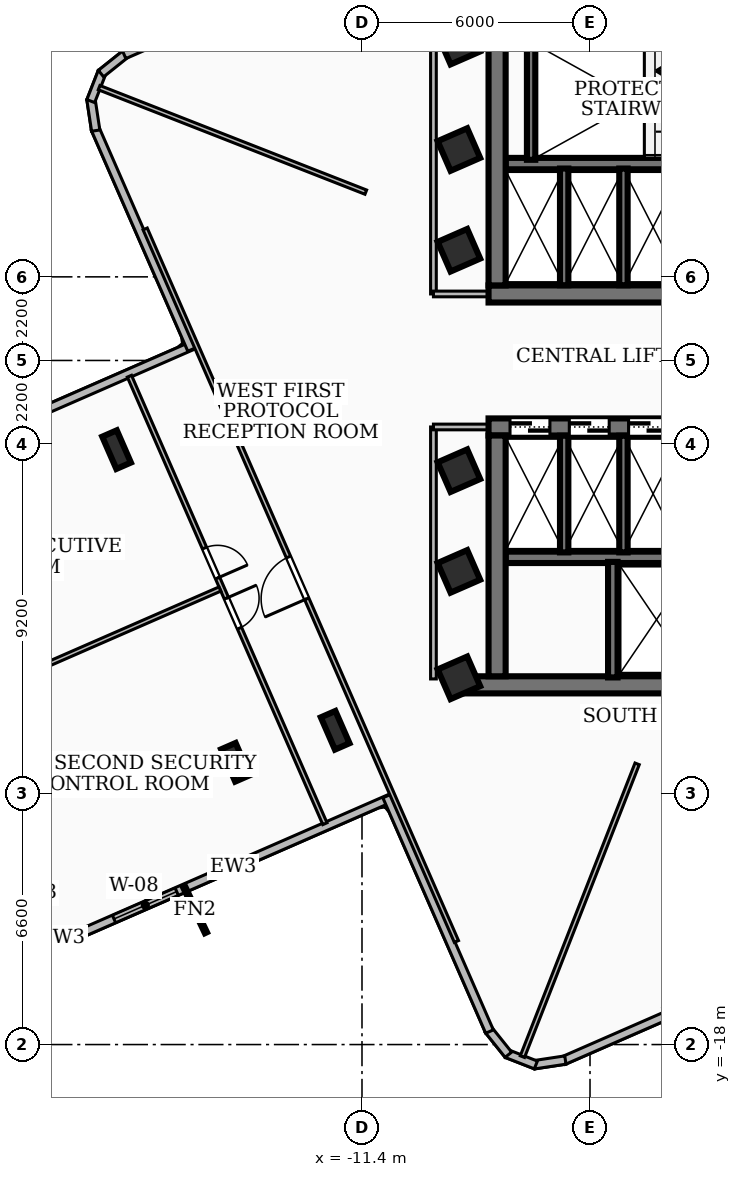
"""IFC4 building model, lengths in metres.
Left out: names, types, materials, properties, quantities, classifications, styles, units other than length and angle.
Written with IfcOpenShell. Run it as: python <this file> out.ifc"""

import sys

from ifc_helpers import new_model, si_unit, direction, frame, frame_2d, origin, origin_2d, place, context, subcontext, project, spatial, rectangle, i_section, extrude, element, fill, save


model = new_model("IFC4")
c1 = context("Model", 3, precision=1e-05, world=origin(), true_north=direction((0.0, 1.0)))
c2 = subcontext(c1, "Body", "Model", "MODEL_VIEW")
j1 = project(units=[si_unit("LENGTHUNIT", "METRE"), si_unit("PLANEANGLEUNIT", "RADIAN")], contexts=[c1])
p1 = place(None, origin())
s1 = spatial("IfcSite", under=j1, at=p1, CompositionType="ELEMENT")
p2 = place(p1, origin())
s2 = spatial("IfcBuilding", under=s1, at=p2, CompositionType="ELEMENT")
p3 = place(p2, frame((0.0, 0.0, 181.08)))
s3 = spatial("IfcBuildingStorey", under=s2, at=p3, CompositionType="ELEMENT", Elevation=181.08)
p4 = place(p3, frame((8.07, 1.75, 0.0), z_axis=(0.0, 0.0, 1.0), x_axis=(-1.0, 0.0, 0.0)))
e1 = element("IfcWall", 1, at=p4, inside=s3, PredefinedType="SHEAR", context=c2, shape_type="SweptSolid", body=[
    extrude(rectangle(XDim=16.14, YDim=0.45, at=frame_2d((8.07, 0.0))), origin(), (0.0, 0.0, 1.0), 3.34),
])
p5 = place(p4, frame((7.45, 0.0, 0.0)))
e2 = element("IfcOpeningElement", 2, at=p5, cuts=e1, PredefinedType="OPENING", context=c2, shape_type="SweptSolid", body=[
    extrude(rectangle(XDim=1.0, YDim=2.1, at=frame_2d((0.5, 1.05))), frame((0.0, 0.235, 0.0), z_axis=(0.0, -1.0, 0.0), x_axis=(1.0, 0.0, 0.0)), (0.0, 0.0, 1.0), 0.47),
])
p6 = place(p4, frame((3.85, 0.0, 0.0)))
e3 = element("IfcOpeningElement", 3, at=p6, cuts=e1, PredefinedType="OPENING", context=c2, shape_type="SweptSolid", body=[
    extrude(rectangle(XDim=0.9, YDim=2.06, at=frame_2d((0.45, 1.03))), frame((0.0, 0.235, 0.0), z_axis=(0.0, -1.0, 0.0), x_axis=(1.0, 0.0, 0.0)), (0.0, 0.0, 1.0), 0.47),
])
p7 = place(p4, frame((2.35, 0.0, 0.0)))
e4 = element("IfcOpeningElement", 4, at=p7, cuts=e1, PredefinedType="OPENING", context=c2, shape_type="SweptSolid", body=[
    extrude(rectangle(XDim=0.9, YDim=2.06, at=frame_2d((0.45, 1.03))), frame((0.0, 0.235, 0.0), z_axis=(0.0, -1.0, 0.0), x_axis=(1.0, 0.0, 0.0)), (0.0, 0.0, 1.0), 0.47),
])
p8 = place(p4, frame((0.8, 0.0, 0.0)))
e5 = element("IfcOpeningElement", 5, at=p8, cuts=e1, PredefinedType="OPENING", context=c2, shape_type="SweptSolid", body=[
    extrude(rectangle(XDim=0.9, YDim=2.06, at=frame_2d((0.45, 1.03))), frame((0.0, 0.235, 0.0), z_axis=(0.0, -1.0, 0.0), x_axis=(1.0, 0.0, 0.0)), (0.0, 0.0, 1.0), 0.47),
])
p9 = place(p3, frame((-7.845, 1.975, 0.0), z_axis=(0.0, 0.0, 1.0), x_axis=(0.0, 1.0, 0.0)))
e6 = element("IfcWall", 6, at=p9, inside=s3, PredefinedType="SHEAR", context=c2, shape_type="SweptSolid", body=[
    extrude(rectangle(XDim=6.335, YDim=0.45, at=frame_2d((3.167, 0.0))), origin(), (0.0, 0.0, 1.0), 3.34),
])
p10 = place(p3, frame((7.62, 5.18, 0.0), z_axis=(0.0, 0.0, 1.0), x_axis=(-1.0, 0.0, 0.0)))
e7 = element("IfcWall", 7, at=p10, inside=s3, PredefinedType="SOLIDWALL", context=c2, shape_type="SweptSolid", body=[
    extrude(rectangle(XDim=15.24, YDim=0.3, at=frame_2d((7.62, 0.0))), origin(), (0.0, 0.0, 1.0), 3.34),
])
p11 = place(p10, frame((5.77, 0.0, 0.0)))
e8 = element("IfcOpeningElement", 8, at=p11, cuts=e7, PredefinedType="OPENING", context=c2, shape_type="SweptSolid", body=[
    extrude(rectangle(XDim=1.1, YDim=2.15, at=frame_2d((0.55, 1.075))), frame((0.0, 0.16, 0.0), z_axis=(0.0, -1.0, 0.0), x_axis=(1.0, 0.0, 0.0)), (0.0, 0.0, 1.0), 0.32),
])
p12 = place(p10, frame((2.97, 0.0, 0.0)))
e9 = element("IfcOpeningElement", 9, at=p12, cuts=e7, PredefinedType="OPENING", context=c2, shape_type="SweptSolid", body=[
    extrude(rectangle(XDim=1.1, YDim=2.15, at=frame_2d((0.55, 1.075))), frame((0.0, 0.16, 0.0), z_axis=(0.0, -1.0, 0.0), x_axis=(1.0, 0.0, 0.0)), (0.0, 0.0, 1.0), 0.32),
])
p13 = place(p10, frame((7.97, 0.0, 0.0)))
e10 = element("IfcOpeningElement", 10, at=p13, cuts=e7, PredefinedType="OPENING", context=c2, shape_type="SweptSolid", body=[
    extrude(rectangle(XDim=1.0, YDim=2.1, at=frame_2d((0.5, 1.05))), frame((0.0, 0.16, 0.0), z_axis=(0.0, -1.0, 0.0), x_axis=(1.0, 0.0, 0.0)), (0.0, 0.0, 1.0), 0.32),
])
p14 = place(p3, frame((8.78, -8.535, 0.0), z_axis=(0.0, 0.0, 1.0), x_axis=(-1.0, 0.0, 0.0)))
e11 = element("IfcWall", 11, at=p14, inside=s3, PredefinedType="SHEAR", context=c2, shape_type="SweptSolid", body=[
    extrude(rectangle(XDim=17.56, YDim=0.45, at=frame_2d((8.78, 0.0))), origin(), (0.0, 0.0, 1.0), 3.34),
])
p15 = place(p3, frame((-8.07, -1.75, 0.0), z_axis=(0.0, 0.0, 1.0), x_axis=(1.0, 0.0, 0.0)))
e12 = element("IfcWall", 12, at=p15, inside=s3, PredefinedType="SHEAR", context=c2, shape_type="SweptSolid", body=[
    extrude(rectangle(XDim=16.14, YDim=0.45, at=frame_2d((8.07, 0.0))), origin(), (0.0, 0.0, 1.0), 3.34),
])
p16 = place(p15, frame((7.45, 0.0, 0.0)))
e13 = element("IfcOpeningElement", 13, at=p16, cuts=e12, PredefinedType="OPENING", context=c2, shape_type="SweptSolid", body=[
    extrude(rectangle(XDim=1.0, YDim=2.1, at=frame_2d((0.5, 1.05))), frame((0.0, 0.235, 0.0), z_axis=(0.0, -1.0, 0.0), x_axis=(1.0, 0.0, 0.0)), (0.0, 0.0, 1.0), 0.47),
])
p17 = place(p15, frame((12.65, 0.0, 0.0)))
e14 = element("IfcOpeningElement", 14, at=p17, cuts=e12, PredefinedType="OPENING", context=c2, shape_type="SweptSolid", body=[
    extrude(rectangle(XDim=0.9, YDim=2.06, at=frame_2d((0.45, 1.03))), frame((0.0, 0.235, 0.0), z_axis=(0.0, -1.0, 0.0), x_axis=(1.0, 0.0, 0.0)), (0.0, 0.0, 1.0), 0.47),
])
p18 = place(p15, frame((0.565, 0.0, 0.0)))
e15 = element("IfcOpeningElement", 15, at=p18, cuts=e12, PredefinedType="OPENING", context=c2, shape_type="SweptSolid", body=[
    extrude(rectangle(XDim=1.05, YDim=2.15, at=frame_2d((0.525, 1.075))), frame((0.0, 0.235, 0.0), z_axis=(0.0, -1.0, 0.0), x_axis=(1.0, 0.0, 0.0)), (0.0, 0.0, 1.0), 0.47),
])
p19 = place(p15, frame((2.125, 0.0, 0.0)))
e16 = element("IfcOpeningElement", 16, at=p19, cuts=e12, PredefinedType="OPENING", context=c2, shape_type="SweptSolid", body=[
    extrude(rectangle(XDim=1.05, YDim=2.15, at=frame_2d((0.525, 1.075))), frame((0.0, 0.235, 0.0), z_axis=(0.0, -1.0, 0.0), x_axis=(1.0, 0.0, 0.0)), (0.0, 0.0, 1.0), 0.47),
])
p20 = place(p15, frame((3.685, 0.0, 0.0)))
e17 = element("IfcOpeningElement", 17, at=p20, cuts=e12, PredefinedType="OPENING", context=c2, shape_type="SweptSolid", body=[
    extrude(rectangle(XDim=1.05, YDim=2.15, at=frame_2d((0.525, 1.075))), frame((0.0, 0.235, 0.0), z_axis=(0.0, -1.0, 0.0), x_axis=(1.0, 0.0, 0.0)), (0.0, 0.0, 1.0), 0.47),
])
p21 = place(p3, frame((-7.845, -8.31, 0.0), z_axis=(0.0, 0.0, 1.0), x_axis=(0.0, 1.0, 0.0)))
e18 = element("IfcWall", 18, at=p21, inside=s3, PredefinedType="SHEAR", context=c2, shape_type="SweptSolid", body=[
    extrude(rectangle(XDim=6.335, YDim=0.45, at=frame_2d((3.167, 0.0))), origin(), (0.0, 0.0, 1.0), 3.34),
])
p22 = place(p3, frame((-7.62, -5.18, 0.0), z_axis=(0.0, 0.0, 1.0), x_axis=(1.0, 0.0, 0.0)))
e19 = element("IfcWall", 19, at=p22, inside=s3, PredefinedType="SOLIDWALL", context=c2, shape_type="SweptSolid", body=[
    extrude(rectangle(XDim=15.24, YDim=0.3, at=frame_2d((7.62, 0.0))), origin(), (0.0, 0.0, 1.0), 3.34),
])
p23 = place(p22, frame((5.77, 0.0, 0.0)))
e20 = element("IfcOpeningElement", 20, at=p23, cuts=e19, PredefinedType="OPENING", context=c2, shape_type="SweptSolid", body=[
    extrude(rectangle(XDim=1.1, YDim=2.15, at=frame_2d((0.55, 1.075))), frame((0.0, 0.16, 0.0), z_axis=(0.0, -1.0, 0.0), x_axis=(1.0, 0.0, 0.0)), (0.0, 0.0, 1.0), 0.32),
])
p24 = place(p22, frame((7.97, 0.0, 0.0)))
e21 = element("IfcOpeningElement", 21, at=p24, cuts=e19, PredefinedType="OPENING", context=c2, shape_type="SweptSolid", body=[
    extrude(rectangle(XDim=1.0, YDim=2.1, at=frame_2d((0.5, 1.05))), frame((0.0, 0.16, 0.0), z_axis=(0.0, -1.0, 0.0), x_axis=(1.0, 0.0, 0.0)), (0.0, 0.0, 1.0), 0.32),
])
p25 = place(p3, frame((-6.95, 5.28, 0.0), z_axis=(0.0, 0.0, 1.0), x_axis=(0.0, 1.0, 0.0)))
e22 = element("IfcWall", 22, at=p25, inside=s3, PredefinedType="SOLIDWALL", context=c2, shape_type="SweptSolid", body=[
    extrude(rectangle(XDim=3.06, YDim=0.22, at=frame_2d((1.53, 0.0))), origin(), (0.0, 0.0, 1.0), 3.34),
])
p26 = place(p3, frame((-4.8, -8.34, 0.0), z_axis=(0.0, 0.0, 1.0), x_axis=(0.0, 1.0, 0.0)))
e23 = element("IfcWall", 23, at=p26, inside=s3, PredefinedType="SOLIDWALL", context=c2, shape_type="SweptSolid", body=[
    extrude(rectangle(XDim=3.04, YDim=0.25, at=frame_2d((1.52, 0.0))), origin(), (0.0, 0.0, 1.0), 3.34),
])
for number, where, z_axis, x_axis in (
    (24, (-6.08, 1.98, 0.0), (0.0, 0.0, 1.0), (0.0, 1.0, 0.0)),
    (25, (-4.52, 1.98, 0.0), (0.0, 0.0, 1.0), (0.0, 1.0, 0.0)),
    (26, (-6.08, -5.05, 0.0), (0.0, 0.0, 1.0), (0.0, 1.0, 0.0)),
    (27, (-4.52, -5.05, 0.0), (0.0, 0.0, 1.0), (0.0, 1.0, 0.0)),
):
    element("IfcWall", number, at=place(p3, frame(where, z_axis=z_axis, x_axis=x_axis)), inside=s3, PredefinedType="SOLIDWALL", context=c2, shape_type="SweptSolid", body=[
        extrude(rectangle(XDim=3.07, YDim=0.22, at=frame_2d((1.535, 0.0))), origin(), (0.0, 0.0, 1.0), 3.34),
    ])
for number, where, z_axis, x_axis in (
    (28, (-8.85, -5.55, 0.0), (0.0, 0.0, 1.0), (0.916, 0.4, 0.0)),
    (29, (-8.85, -2.9, 0.0), (0.0, 0.0, 1.0), (0.916, 0.4, 0.0)),
    (30, (-8.85, 2.9, 0.0), (0.0, 0.0, 1.0), (0.916, 0.4, 0.0)),
    (31, (-8.85, 5.55, 0.0), (0.0, 0.0, 1.0), (0.916, 0.4, 0.0)),
    (32, (-8.85, 8.35, 0.0), (0.0, 0.0, 1.0), (0.916, 0.4, 0.0)),
    (33, (-8.85, -8.35, 0.0), (0.0, 0.0, 1.0), (0.916, 0.4, 0.0)),
):
    element("IfcColumn", number, at=place(p3, frame(where, z_axis=z_axis, x_axis=x_axis)), inside=s3, PredefinedType="COLUMN", context=c2, shape_type="SweptSolid", body=[
        extrude(rectangle(XDim=0.85, YDim=0.85, at=origin_2d()), origin(), (0.0, 0.0, 1.0), 3.6),
    ])
for number, where, z_axis, x_axis in (
    (34, (-17.858, -2.346, 0.0), (0.0, 0.0, 1.0), (0.916, 0.4, 0.0)),
    (35, (-12.106, -9.731, 0.0), (0.0, 0.0, 1.0), (0.916, 0.4, 0.0)),
    (36, (-14.731, -10.573, 0.0), (0.0, 0.0, 1.0), (0.916, 0.4, 0.0)),
):
    element("IfcColumn", number, at=place(p3, frame(where, z_axis=z_axis, x_axis=x_axis)), inside=s3, PredefinedType="COLUMN", context=c2, shape_type="SweptSolid", body=[
        extrude(i_section(OverallWidth=0.418, OverallDepth=0.927, WebThickness=0.019, FlangeThickness=0.032, at=origin_2d()), origin(), (0.0, 0.0, 1.0), 3.6),
    ])
p27 = place(p3, frame((-10.634, -11.51, 0.0), z_axis=(0.0, 0.0, 1.0), x_axis=(-0.91637186732, -0.400328116405, 0.0)))
e37 = element("IfcWall", 37, at=p27, inside=s3, PredefinedType="SOLIDWALL", context=c2, shape_type="SweptSolid", body=[
    extrude(rectangle(XDim=9.058, YDim=0.22, at=frame_2d((4.529, 0.0))), origin(), (0.0, 0.0, 1.0), 3.34),
])
p28 = place(p27, frame((6.157, 0.0, 0.85)))
e38 = element("IfcOpeningElement", 38, at=p28, cuts=e37, PredefinedType="OPENING", context=c2, shape_type="SweptSolid", body=[
    extrude(rectangle(XDim=1.8, YDim=1.8, at=frame_2d((0.9, 0.9))), frame((0.0, 0.12, 0.0), z_axis=(0.0, -1.0, 0.0), x_axis=(1.0, 0.0, 0.0)), (0.0, 0.0, 1.0), 0.24),
])
p29 = place(p3, frame((-18.886, -15.122, 0.0), z_axis=(0.0, 0.0, 1.0), x_axis=(-0.988566813851, -0.150783469095, 0.0)))
e39 = element("IfcWall", 39, at=p29, inside=s3, PredefinedType="SOLIDWALL", context=c2, shape_type="SweptSolid", body=[
    extrude(rectangle(XDim=0.835, YDim=0.22, at=frame_2d((0.418, 0.0))), origin(), (0.0, 0.0, 1.0), 3.34),
])
p30 = place(p3, frame((-24.139, -3.224, 0.0), z_axis=(0.0, 0.0, 1.0), x_axis=(0.916356987606, 0.400362175117, 0.0)))
e40 = element("IfcWall", 40, at=p30, inside=s3, PredefinedType="SOLIDWALL", context=c2, shape_type="SweptSolid", body=[
    extrude(rectangle(XDim=9.06, YDim=0.22, at=frame_2d((4.53, 0.0))), origin(), (0.0, 0.0, 1.0), 3.34),
])
p31 = place(p30, frame((1.1, 0.0, 0.85)))
e41 = element("IfcOpeningElement", 41, at=p31, cuts=e40, PredefinedType="OPENING", context=c2, shape_type="SweptSolid", body=[
    extrude(rectangle(XDim=2.4, YDim=2.1, at=frame_2d((1.2, 1.05))), frame((0.0, 0.12, 0.0), z_axis=(0.0, -1.0, 0.0), x_axis=(1.0, 0.0, 0.0)), (0.0, 0.0, 1.0), 0.24),
])
p32 = place(p3, frame((-15.883, 0.287, 0.0), z_axis=(0.0, 0.0, 1.0), x_axis=(-0.400352069216, 0.916361402872, 0.0)))
e42 = element("IfcWall", 42, at=p32, inside=s3, PredefinedType="SOLIDWALL", context=c2, shape_type="SweptSolid", body=[
    extrude(rectangle(XDim=6.339, YDim=0.22, at=frame_2d((3.169, 0.0))), origin(), (0.0, 0.0, 1.0), 3.34),
])
p33 = place(p3, frame((-18.407, 6.048, 0.0), z_axis=(0.0, 0.0, 1.0), x_axis=(-0.149814047271, 0.988714190876, 0.0)))
e43 = element("IfcWall", 43, at=p33, inside=s3, PredefinedType="SOLIDWALL", context=c2, shape_type="SweptSolid", body=[
    extrude(rectangle(XDim=0.834, YDim=0.22, at=frame_2d((0.417, 0.0))), origin(), (0.0, 0.0, 1.0), 3.34),
])
p34 = place(p3, frame((-18.537, 6.825, 0.0), z_axis=(0.0, 0.0, 1.0), x_axis=(0.364331843435, 0.931269191941, 0.0)))
e44 = element("IfcWall", 44, at=p34, inside=s3, PredefinedType="SOLIDWALL", context=c2, shape_type="SweptSolid", body=[
    extrude(rectangle(XDim=0.818, YDim=0.22, at=frame_2d((0.409, 0.0))), origin(), (0.0, 0.0, 1.0), 3.34),
])
p35 = place(p3, frame((-18.268, 7.548, 0.0), z_axis=(0.0, 0.0, 1.0), x_axis=(0.781153625844, 0.624338860581, 0.0)))
e45 = element("IfcWall", 45, at=p35, inside=s3, PredefinedType="SOLIDWALL", context=c2, shape_type="SweptSolid", body=[
    extrude(rectangle(XDim=0.836, YDim=0.22, at=frame_2d((0.418, 0.0))), origin(), (0.0, 0.0, 1.0), 3.34),
])
p36 = place(p3, frame((-17.658, 8.044, 0.0), z_axis=(0.0, 0.0, 1.0), x_axis=(0.916361145567, 0.400352658158, 0.0)))
e46 = element("IfcWall", 46, at=p36, inside=s3, PredefinedType="SOLIDWALL", context=c2, shape_type="SweptSolid", body=[
    extrude(rectangle(XDim=6.759, YDim=0.22, at=frame_2d((3.38, 0.0))), origin(), (0.0, 0.0, 1.0), 3.34),
])
p37 = place(p3, frame((-0.287, -15.883, 0.0), z_axis=(0.0, 0.0, 1.0), x_axis=(-0.916361402872, -0.400352069216, 0.0)))
e47 = element("IfcWall", 47, at=p37, inside=s3, PredefinedType="SOLIDWALL", context=c2, shape_type="SweptSolid", body=[
    extrude(rectangle(XDim=6.339, YDim=0.22, at=frame_2d((3.169, 0.0))), origin(), (0.0, 0.0, 1.0), 3.34),
])
p38 = place(p3, frame((-6.048, -18.407, 0.0), z_axis=(0.0, 0.0, 1.0), x_axis=(-0.988714190876, -0.149814047271, 0.0)))
e48 = element("IfcWall", 48, at=p38, inside=s3, PredefinedType="SOLIDWALL", context=c2, shape_type="SweptSolid", body=[
    extrude(rectangle(XDim=0.834, YDim=0.22, at=frame_2d((0.417, 0.0))), origin(), (0.0, 0.0, 1.0), 3.34),
])
p39 = place(p3, frame((-6.825, -18.537, 0.0), z_axis=(0.0, 0.0, 1.0), x_axis=(-0.931269191941, 0.364331843435, 0.0)))
e49 = element("IfcWall", 49, at=p39, inside=s3, PredefinedType="SOLIDWALL", context=c2, shape_type="SweptSolid", body=[
    extrude(rectangle(XDim=0.818, YDim=0.22, at=frame_2d((0.409, 0.0))), origin(), (0.0, 0.0, 1.0), 3.34),
])
p40 = place(p3, frame((-7.548, -18.268, 0.0), z_axis=(0.0, 0.0, 1.0), x_axis=(-0.624338860581, 0.781153625844, 0.0)))
e50 = element("IfcWall", 50, at=p40, inside=s3, PredefinedType="SOLIDWALL", context=c2, shape_type="SweptSolid", body=[
    extrude(rectangle(XDim=0.836, YDim=0.22, at=frame_2d((0.418, 0.0))), origin(), (0.0, 0.0, 1.0), 3.34),
])
p41 = place(p3, frame((-8.044, -17.658, 0.0), z_axis=(0.0, 0.0, 1.0), x_axis=(-0.400352658158, 0.916361145567, 0.0)))
e51 = element("IfcWall", 51, at=p41, inside=s3, PredefinedType="SOLIDWALL", context=c2, shape_type="SweptSolid", body=[
    extrude(rectangle(XDim=6.759, YDim=0.22, at=frame_2d((3.38, 0.0))), origin(), (0.0, 0.0, 1.0), 3.34),
])
p42 = place(p3, frame((-9.52, 1.75, 0.0), z_axis=(0.0, 0.0, 1.0), x_axis=(0.0, 1.0, 0.0)))
e52 = element("IfcWall", 52, at=p42, inside=s3, PredefinedType="PARTITIONING", context=c2, shape_type="SweptSolid", body=[
    extrude(rectangle(XDim=6.63, YDim=0.15, at=frame_2d((3.315, 0.0))), origin(), (0.0, 0.0, 1.0), 3.34),
])
p43 = place(p3, frame((-7.85, 1.75, 0.0), z_axis=(0.0, 0.0, 1.0), x_axis=(-1.0, 0.0, 0.0)))
e53 = element("IfcWall", 53, at=p43, inside=s3, PredefinedType="PARTITIONING", context=c2, shape_type="SweptSolid", body=[
    extrude(rectangle(XDim=1.67, YDim=0.15, at=frame_2d((0.835, 0.0))), origin(), (0.0, 0.0, 1.0), 2.57),
])
p44 = place(p3, frame((-9.52, -8.38, 0.0), z_axis=(0.0, 0.0, 1.0), x_axis=(0.0, 1.0, 0.0)))
e54 = element("IfcWall", 54, at=p44, inside=s3, PredefinedType="PARTITIONING", context=c2, shape_type="SweptSolid", body=[
    extrude(rectangle(XDim=6.63, YDim=0.15, at=frame_2d((3.315, 0.0))), origin(), (0.0, 0.0, 1.0), 2.644),
])
p45 = place(p3, frame((-7.85, -1.75, 0.0), z_axis=(0.0, 0.0, 1.0), x_axis=(-1.0, 0.0, 0.0)))
e55 = element("IfcWall", 55, at=p45, inside=s3, PredefinedType="PARTITIONING", context=c2, shape_type="SweptSolid", body=[
    extrude(rectangle(XDim=1.67, YDim=0.15, at=frame_2d((0.835, 0.0))), origin(), (0.0, 0.0, 1.0), 2.57),
])
p46 = place(p3, frame((-11.3, 4.429, 0.0), z_axis=(0.0, 0.0, 1.0), x_axis=(-0.931071596241, 0.364836514995, 0.0)))
e56 = element("IfcWall", 56, at=p46, inside=s3, PredefinedType="PARTITIONING", context=c2, shape_type="SweptSolid", body=[
    extrude(rectangle(XDim=7.538, YDim=0.12, at=frame_2d((3.769, 0.0))), origin(), (0.0, 0.0, 1.0), 3.34),
])
p47 = place(p3, frame((-4.16, -10.614, 0.0), z_axis=(0.0, 0.0, 1.0), x_axis=(-0.364859873544, -0.931062442953, 0.0)))
e57 = element("IfcWall", 57, at=p47, inside=s3, PredefinedType="PARTITIONING", context=c2, shape_type="SweptSolid", body=[
    extrude(rectangle(XDim=8.274, YDim=0.12, at=frame_2d((4.137, 0.0))), origin(), (0.0, 0.0, 1.0), 3.34),
])
p48 = place(p3, frame((-8.915, -15.288, 0.0), z_axis=(0.0, 0.0, 1.0), x_axis=(-0.400335531383, 0.916368627962, 0.0)))
e58 = element("IfcWall", 58, at=p48, inside=s3, PredefinedType="PARTITIONING", context=c2, shape_type="SweptSolid", body=[
    extrude(rectangle(XDim=20.46, YDim=0.12, at=frame_2d((10.23, 0.0))), origin(), (0.0, 0.0, 1.0), 2.644),
])
p49 = place(p48, frame((9.84, 0.0, 0.0)))
e59 = element("IfcOpeningElement", 59, at=p49, cuts=e58, PredefinedType="OPENING", context=c2, shape_type="SweptSolid", body=[
    extrude(rectangle(XDim=1.2, YDim=2.1, at=frame_2d((0.6, 1.05))), frame((0.0, 0.07, 0.0), z_axis=(0.0, -1.0, 0.0), x_axis=(1.0, 0.0, 0.0)), (0.0, 0.0, 1.0), 0.14),
])
p50 = place(p3, frame((-15.139, -6.014, 0.0), z_axis=(0.0, 0.0, 1.0), x_axis=(-0.916360078354, -0.400355100878, 0.0)))
e60 = element("IfcWall", 60, at=p50, inside=s3, PredefinedType="PARTITIONING", context=c2, shape_type="SweptSolid", body=[
    extrude(rectangle(XDim=8.535, YDim=0.12, at=frame_2d((4.268, 0.0))), origin(), (0.0, 0.0, 1.0), 3.34),
])
p51 = place(p3, frame((-17.52, -0.414, 0.0), z_axis=(0.0, 0.0, 1.0), x_axis=(0.400330383156, -0.916370877059, 0.0)))
e61 = element("IfcWall", 61, at=p51, inside=s3, PredefinedType="PARTITIONING", context=c2, shape_type="SweptSolid", body=[
    extrude(rectangle(XDim=12.85, YDim=0.12, at=frame_2d((6.425, 0.0))), origin(), (0.0, 0.0, 1.0), 2.644),
])
p52 = place(p51, frame((4.935, 0.0, 0.0)))
e62 = element("IfcOpeningElement", 62, at=p52, cuts=e61, PredefinedType="OPENING", context=c2, shape_type="SweptSolid", body=[
    extrude(rectangle(XDim=0.86, YDim=2.04, at=frame_2d((0.43, 1.02))), frame((0.0, 0.07, 0.0), z_axis=(0.0, -1.0, 0.0), x_axis=(1.0, 0.0, 0.0)), (0.0, 0.0, 1.0), 0.14),
])
p53 = place(p51, frame((6.375, 0.0, 0.0)))
e63 = element("IfcOpeningElement", 63, at=p53, cuts=e61, PredefinedType="OPENING", context=c2, shape_type="SweptSolid", body=[
    extrude(rectangle(XDim=0.86, YDim=2.04, at=frame_2d((0.43, 1.02))), frame((0.0, 0.07, 0.0), z_axis=(0.0, -1.0, 0.0), x_axis=(1.0, 0.0, 0.0)), (0.0, 0.0, 1.0), 0.14),
])
p54 = place(p28, origin())
e64 = element("IfcWindow", 64, at=p54, inside=s3, PartitioningType="SINGLE_PANEL", PredefinedType="WINDOW", context=c2, shape_type="SweptSolid", body=[
    extrude(rectangle(XDim=1.8, YDim=1.8, at=frame_2d((0.9, 0.9))), frame((0.0, 0.03, 0.0), z_axis=(0.0, -1.0, 0.0), x_axis=(1.0, 0.0, 0.0)), (0.0, 0.0, 1.0), 0.06),
])
fill(e38, e64)
p55 = place(p18, origin())
e65 = element("IfcDoor", 65, at=p55, inside=s3, OperationType="DOUBLE_DOOR_SLIDING", PredefinedType="DOOR", context=c2, shape_type="SweptSolid", body=[
    extrude(rectangle(XDim=1.05, YDim=2.15, at=frame_2d((0.525, 1.075))), frame((0.0, 0.025, 0.0), z_axis=(0.0, -1.0, 0.0), x_axis=(1.0, 0.0, 0.0)), (0.0, 0.0, 1.0), 0.05),
])
fill(e15, e65)
p56 = place(p19, origin())
e66 = element("IfcDoor", 66, at=p56, inside=s3, OperationType="DOUBLE_DOOR_SLIDING", PredefinedType="DOOR", context=c2, shape_type="SweptSolid", body=[
    extrude(rectangle(XDim=1.05, YDim=2.15, at=frame_2d((0.525, 1.075))), frame((0.0, 0.025, 0.0), z_axis=(0.0, -1.0, 0.0), x_axis=(1.0, 0.0, 0.0)), (0.0, 0.0, 1.0), 0.05),
])
fill(e16, e66)
p57 = place(p20, origin())
e67 = element("IfcDoor", 67, at=p57, inside=s3, OperationType="DOUBLE_DOOR_SLIDING", PredefinedType="DOOR", context=c2, shape_type="SweptSolid", body=[
    extrude(rectangle(XDim=1.05, YDim=2.15, at=frame_2d((0.525, 1.075))), frame((0.0, 0.025, 0.0), z_axis=(0.0, -1.0, 0.0), x_axis=(1.0, 0.0, 0.0)), (0.0, 0.0, 1.0), 0.05),
])
fill(e17, e67)
p58 = place(p49, origin())
e68 = element("IfcDoor", 68, at=p58, inside=s3, OperationType="SINGLE_SWING_LEFT", PredefinedType="DOOR", context=c2, shape_type="SweptSolid", body=[
    extrude(rectangle(XDim=1.2, YDim=2.1, at=frame_2d((0.6, 1.05))), frame((0.0, 0.025, 0.0), z_axis=(0.0, -1.0, 0.0), x_axis=(1.0, 0.0, 0.0)), (0.0, 0.0, 1.0), 0.05),
])
fill(e59, e68)
p59 = place(p52, origin())
e69 = element("IfcDoor", 69, at=p59, inside=s3, OperationType="SINGLE_SWING_RIGHT", PredefinedType="DOOR", context=c2, shape_type="SweptSolid", body=[
    extrude(rectangle(XDim=0.86, YDim=2.04, at=frame_2d((0.43, 1.02))), frame((0.0, 0.025, 0.0), z_axis=(0.0, -1.0, 0.0), x_axis=(1.0, 0.0, 0.0)), (0.0, 0.0, 1.0), 0.05),
])
fill(e62, e69)
p60 = place(p53, origin())
e70 = element("IfcDoor", 70, at=p60, inside=s3, OperationType="SINGLE_SWING_LEFT", PredefinedType="DOOR", context=c2, shape_type="SweptSolid", body=[
    extrude(rectangle(XDim=0.86, YDim=2.04, at=frame_2d((0.43, 1.02))), frame((0.0, 0.025, 0.0), z_axis=(0.0, -1.0, 0.0), x_axis=(1.0, 0.0, 0.0)), (0.0, 0.0, 1.0), 0.05),
])
fill(e63, e70)
save(model, sys.argv[1])
